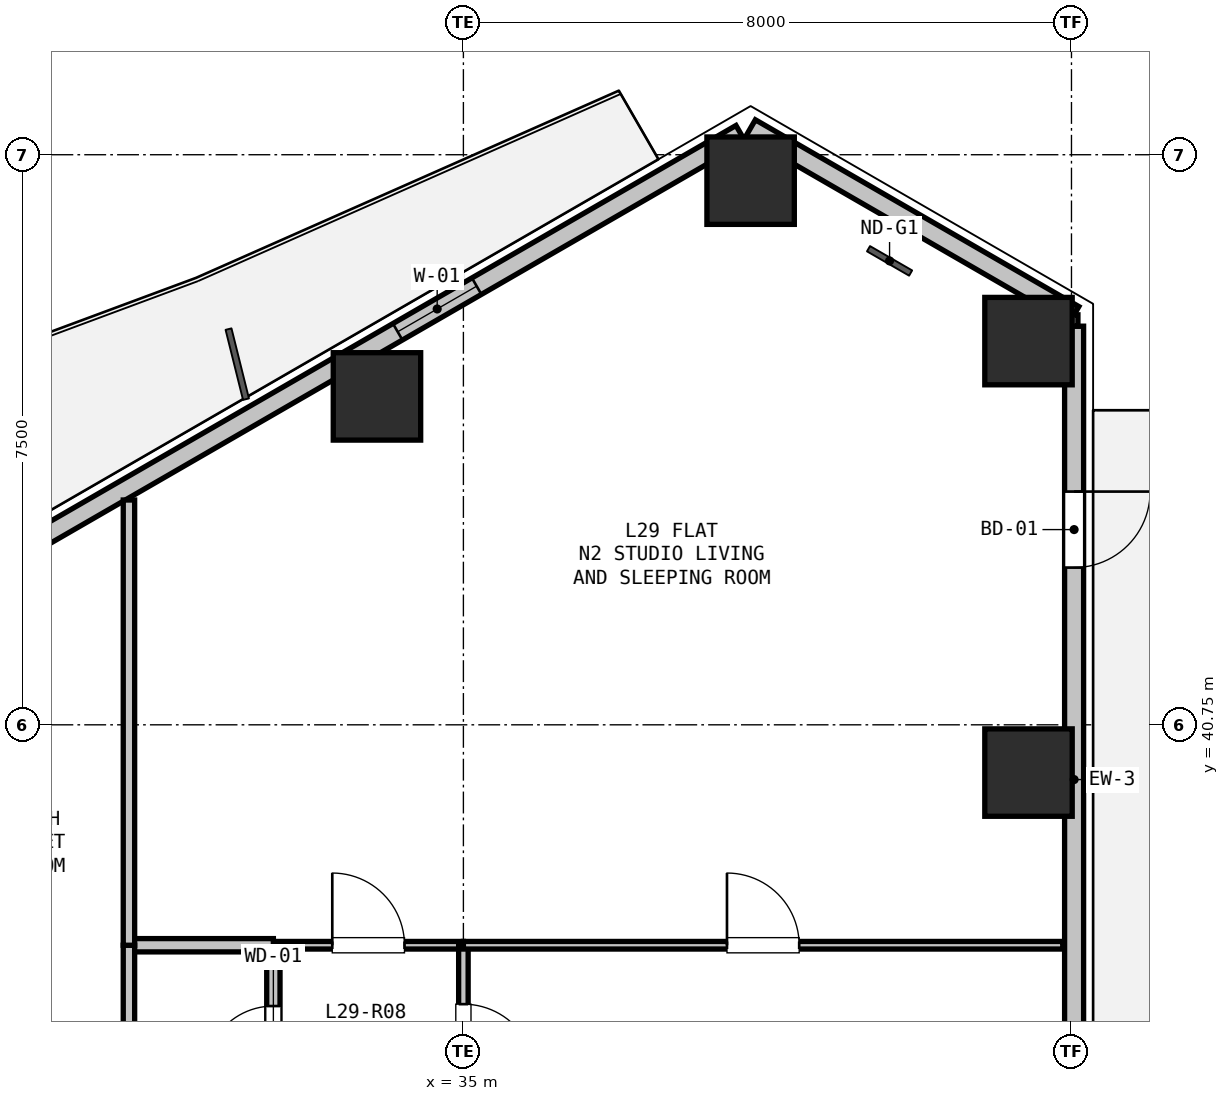
"""IFC4 building model, lengths in metres.
Left out: names, types, materials, properties, quantities, classifications, styles, units other than length and angle.
Written with IfcOpenShell. Run it as: python <this file> out.ifc"""

import sys

from ifc_helpers import new_model, si_unit, direction, frame, frame_2d, origin, origin_2d, place, context, subcontext, project, spatial, rectangle, hollow_rectangle, extrude, element, fill, save


model = new_model("IFC4")
c1 = context("Model", 3, precision=1e-05, world=origin(), true_north=direction((0.0, 1.0)))
c2 = subcontext(c1, "Body", "Model", "MODEL_VIEW")
j1 = project(units=[si_unit("LENGTHUNIT", "METRE"), si_unit("PLANEANGLEUNIT", "RADIAN")], contexts=[c1])
p1 = place(None, origin())
s1 = spatial("IfcSite", under=j1, at=p1, CompositionType="ELEMENT")
p2 = place(p1, origin())
s2 = spatial("IfcBuilding", under=s1, at=p2, CompositionType="ELEMENT")
p3 = place(p2, frame((0.0, 0.0, 106.5)))
s3 = spatial("IfcBuildingStorey", under=s2, at=p3, CompositionType="ELEMENT", Elevation=106.5)
for number, where, z_axis, x_axis in (
    (1, (33.863, 45.071, 0.0), (0.0, 0.0, 1.0), (1.0, 0.0, 0.0)),
    (2, (38.779, 47.909, 0.0), (0.0, 0.0, 1.0), (1.0, 0.0, 0.0)),
    (3, (42.435, 45.798, 0.0), (0.0, 0.0, 1.0), (1.0, 0.0, 0.0)),
    (4, (42.435, 40.122, 0.0), (0.0, 0.0, 1.0), (1.0, 0.0, 0.0)),
):
    element("IfcColumn", number, at=place(p3, frame(where, z_axis=z_axis, x_axis=x_axis)), inside=s3, PredefinedType="COLUMN", context=c2, shape_type="SweptSolid", body=[
        extrude(hollow_rectangle(XDim=1.15, YDim=1.15, WallThickness=0.032, at=origin_2d()), origin(), (0.0, 0.0, 1.0), 3.3),
    ])
p4 = place(p3, frame((38.779, 48.602, 0.0), z_axis=(0.0, 0.0, 1.0), x_axis=(0.866011848704, -0.500023477353, 0.0)))
e5 = element("IfcWall", 5, at=p4, inside=s3, PredefinedType="SOLIDWALL", context=c2, shape_type="SweptSolid", body=[
    extrude(rectangle(XDim=4.914, YDim=0.25, at=frame_2d((2.457, 0.0))), origin(), (0.0, 0.0, 1.0), 2.67),
])
p5 = place(p3, frame((28.317, 42.562, 0.0), z_axis=(0.0, 0.0, 1.0), x_axis=(0.866023023012, 0.500004123596, 0.0)))
e6 = element("IfcWall", 6, at=p5, inside=s3, PredefinedType="SOLIDWALL", context=c2, shape_type="SweptSolid", body=[
    extrude(rectangle(XDim=11.93, YDim=0.25, at=frame_2d((5.965, 0.0))), origin(), (0.0, 0.0, 1.0), 2.67),
])
p6 = place(p5, frame((6.718, 0.0, 0.9)))
e7 = element("IfcOpeningElement", 7, at=p6, cuts=e6, PredefinedType="OPENING", context=c2, shape_type="SweptSolid", body=[
    extrude(rectangle(XDim=1.2, YDim=1.4, at=frame_2d((0.6, 0.7))), frame((0.0, 0.135, 0.0), z_axis=(0.0, -1.0, 0.0), x_axis=(1.0, 0.0, 0.0)), (0.0, 0.0, 1.0), 0.27),
])
p7 = place(p3, frame((43.035, 45.994, 0.0), z_axis=(0.0, 0.0, 1.0), x_axis=(0.0, -1.0, 0.0)))
e8 = element("IfcWall", 8, at=p7, inside=s3, PredefinedType="SOLIDWALL", context=c2, shape_type="SweptSolid", body=[
    extrude(rectangle(XDim=11.93, YDim=0.25, at=frame_2d((5.965, 0.0))), origin(), (0.0, 0.0, 1.0), 2.67),
])
p8 = place(p7, frame((2.176, 0.0, 0.0)))
e9 = element("IfcOpeningElement", 9, at=p8, cuts=e8, PredefinedType="OPENING", context=c2, shape_type="SweptSolid", body=[
    extrude(rectangle(XDim=1.0, YDim=2.1, at=frame_2d((0.5, 1.05))), frame((0.0, 0.135, 0.0), z_axis=(0.0, -1.0, 0.0), x_axis=(1.0, 0.0, 0.0)), (0.0, 0.0, 1.0), 0.27),
])
p9 = place(p3, frame((32.5, 37.85, 0.0), z_axis=(0.0, 0.0, 1.0), x_axis=(1.0, 0.0, 0.0)))
e10 = element("IfcWall", 10, at=p9, inside=s3, PredefinedType="PARTITIONING", context=c2, shape_type="SweptSolid", body=[
    extrude(rectangle(XDim=2.5, YDim=0.1, at=frame_2d((1.25, 0.0))), origin(), (0.0, 0.0, 1.0), 3.05),
])
p10 = place(p9, frame((0.775, 0.0, 0.0)))
e11 = element("IfcOpeningElement", 11, at=p10, cuts=e10, PredefinedType="OPENING", context=c2, shape_type="SweptSolid", body=[
    extrude(rectangle(XDim=0.95, YDim=2.1, at=frame_2d((0.475, 1.05))), frame((0.0, 0.06, 0.0), z_axis=(0.0, -1.0, 0.0), x_axis=(1.0, 0.0, 0.0)), (0.0, 0.0, 1.0), 0.12),
])
p11 = place(p3, frame((35.0, 37.85, 0.0), z_axis=(0.0, 0.0, 1.0), x_axis=(0.0, -1.0, 0.0)))
e12 = element("IfcWall", 12, at=p11, inside=s3, PredefinedType="PARTITIONING", context=c2, shape_type="SweptSolid", body=[
    extrude(rectangle(XDim=2.5, YDim=0.125, at=frame_2d((1.25, 0.0))), origin(), (0.0, 0.0, 1.0), 3.05),
])
p12 = place(p11, frame((0.775, 0.0, 0.0)))
e13 = element("IfcOpeningElement", 13, at=p12, cuts=e12, PredefinedType="OPENING", context=c2, shape_type="SweptSolid", body=[
    extrude(rectangle(XDim=0.95, YDim=2.1, at=frame_2d((0.475, 1.05))), frame((0.0, 0.073, 0.0), z_axis=(0.0, -1.0, 0.0), x_axis=(1.0, 0.0, 0.0)), (0.0, 0.0, 1.0), 0.145),
])
p13 = place(p3, frame((32.5, 35.35, 0.0), z_axis=(0.0, 0.0, 1.0), x_axis=(0.0, 1.0, 0.0)))
e14 = element("IfcWall", 14, at=p13, inside=s3, PredefinedType="PLUMBINGWALL", context=c2, shape_type="SweptSolid", body=[
    extrude(rectangle(XDim=2.5, YDim=0.175, at=frame_2d((1.25, 0.0))), origin(), (0.0, 0.0, 1.0), 3.05),
])
p14 = place(p13, frame((0.8, 0.0, 0.0)))
e15 = element("IfcOpeningElement", 15, at=p14, cuts=e14, PredefinedType="OPENING", context=c2, shape_type="SweptSolid", body=[
    extrude(rectangle(XDim=0.9, YDim=2.1, at=frame_2d((0.45, 1.05))), frame((0.0, 0.097, 0.0), z_axis=(0.0, -1.0, 0.0), x_axis=(1.0, 0.0, 0.0)), (0.0, 0.0, 1.0), 0.195),
])
p15 = place(p3, frame((30.6, 37.85, 0.0), z_axis=(0.0, 0.0, 1.0), x_axis=(1.0, 0.0, 0.0)))
e16 = element("IfcWall", 16, at=p15, inside=s3, PredefinedType="PLUMBINGWALL", context=c2, shape_type="SweptSolid", body=[
    extrude(rectangle(XDim=1.9, YDim=0.175, at=frame_2d((0.95, 0.0))), origin(), (0.0, 0.0, 1.0), 3.05),
])
p16 = place(p3, frame((30.6, 35.35, 0.0), z_axis=(0.0, 0.0, 1.0), x_axis=(0.0, 1.0, 0.0)))
e17 = element("IfcWall", 17, at=p16, inside=s3, PredefinedType="PARTITIONING", context=c2, shape_type="SweptSolid", body=[
    extrude(rectangle(XDim=2.5, YDim=0.15, at=frame_2d((1.25, 0.0))), origin(), (0.0, 0.0, 1.0), 3.05),
])
p17 = place(p3, frame((35.0, 37.85, 0.0), z_axis=(0.0, 0.0, 1.0), x_axis=(1.0, 0.0, 0.0)))
e18 = element("IfcWall", 18, at=p17, inside=s3, PredefinedType="PARTITIONING", context=c2, shape_type="SweptSolid", body=[
    extrude(rectangle(XDim=7.885, YDim=0.1, at=frame_2d((3.943, 0.0))), origin(), (0.0, 0.0, 1.0), 2.365),
])
p18 = place(p17, frame((3.468, 0.0, 0.0)))
e19 = element("IfcOpeningElement", 19, at=p18, cuts=e18, PredefinedType="OPENING", context=c2, shape_type="SweptSolid", body=[
    extrude(rectangle(XDim=0.95, YDim=2.1, at=frame_2d((0.475, 1.05))), frame((0.0, 0.06, 0.0), z_axis=(0.0, -1.0, 0.0), x_axis=(1.0, 0.0, 0.0)), (0.0, 0.0, 1.0), 0.12),
])
p19 = place(p3, frame((30.6, 43.708, 0.0), z_axis=(0.0, 0.0, 1.0), x_axis=(0.0, -1.0, 0.0)))
e20 = element("IfcWall", 20, at=p19, inside=s3, PredefinedType="PARTITIONING", context=c2, shape_type="SweptSolid", body=[
    extrude(rectangle(XDim=5.857, YDim=0.15, at=frame_2d((2.929, 0.0))), origin(), (0.0, 0.0, 1.0), 2.365),
])
p20 = place(p3, frame((43.035, 46.144, 0.0), z_axis=(0.0, 0.0, 1.0), x_axis=(0.0, -1.0, 0.0)))
e21 = element("IfcWall", 21, at=p20, inside=s3, PredefinedType="PARTITIONING", context=c2, shape_type="SweptSolid", body=[
    extrude(rectangle(XDim=0.15, YDim=0.1, at=frame_2d((0.075, 0.0))), origin(), (0.0, 0.0, 1.0), 3.05),
])
p21 = place(p6, origin())
e22 = element("IfcWindow", 22, at=p21, inside=s3, PartitioningType="SINGLE_PANEL", PredefinedType="WINDOW", context=c2, shape_type="SweptSolid", body=[
    extrude(rectangle(XDim=1.2, YDim=1.4, at=frame_2d((0.6, 0.7))), frame((0.0, 0.03, 0.0), z_axis=(0.0, -1.0, 0.0), x_axis=(1.0, 0.0, 0.0)), (0.0, 0.0, 1.0), 0.06),
])
fill(e7, e22)
p22 = place(p8, origin())
e23 = element("IfcDoor", 23, at=p22, inside=s3, OperationType="SINGLE_SWING_LEFT", PredefinedType="DOOR", context=c2, shape_type="SweptSolid", body=[
    extrude(rectangle(XDim=1.0, YDim=2.1, at=frame_2d((0.5, 1.05))), frame((0.0, 0.025, 0.0), z_axis=(0.0, -1.0, 0.0), x_axis=(1.0, 0.0, 0.0)), (0.0, 0.0, 1.0), 0.05),
])
fill(e9, e23)
p23 = place(p14, origin())
e24 = element("IfcDoor", 24, at=p23, inside=s3, OperationType="SINGLE_SWING_LEFT", PredefinedType="DOOR", context=c2, shape_type="SweptSolid", body=[
    extrude(rectangle(XDim=0.9, YDim=2.1, at=frame_2d((0.45, 1.05))), frame((0.0, 0.025, 0.0), z_axis=(0.0, -1.0, 0.0), x_axis=(1.0, 0.0, 0.0)), (0.0, 0.0, 1.0), 0.05),
])
fill(e15, e24)
p24 = place(p12, origin())
e25 = element("IfcDoor", 25, at=p24, inside=s3, OperationType="SINGLE_SWING_RIGHT", PredefinedType="DOOR", context=c2, shape_type="SweptSolid", body=[
    extrude(rectangle(XDim=0.95, YDim=2.1, at=frame_2d((0.475, 1.05))), frame((0.0, 0.025, 0.0), z_axis=(0.0, -1.0, 0.0), x_axis=(1.0, 0.0, 0.0)), (0.0, 0.0, 1.0), 0.05),
])
fill(e13, e25)
p25 = place(p10, origin())
e26 = element("IfcDoor", 26, at=p25, inside=s3, OperationType="SINGLE_SWING_LEFT", PredefinedType="DOOR", context=c2, shape_type="SweptSolid", body=[
    extrude(rectangle(XDim=0.95, YDim=2.1, at=frame_2d((0.475, 1.05))), frame((0.0, 0.025, 0.0), z_axis=(0.0, -1.0, 0.0), x_axis=(1.0, 0.0, 0.0)), (0.0, 0.0, 1.0), 0.05),
])
fill(e11, e26)
p26 = place(p18, origin())
e27 = element("IfcDoor", 27, at=p26, inside=s3, OperationType="SINGLE_SWING_LEFT", PredefinedType="DOOR", context=c2, shape_type="SweptSolid", body=[
    extrude(rectangle(XDim=0.95, YDim=2.1, at=frame_2d((0.475, 1.05))), frame((0.0, 0.025, 0.0), z_axis=(0.0, -1.0, 0.0), x_axis=(1.0, 0.0, 0.0)), (0.0, 0.0, 1.0), 0.05),
])
fill(e19, e27)
save(model, sys.argv[1])
